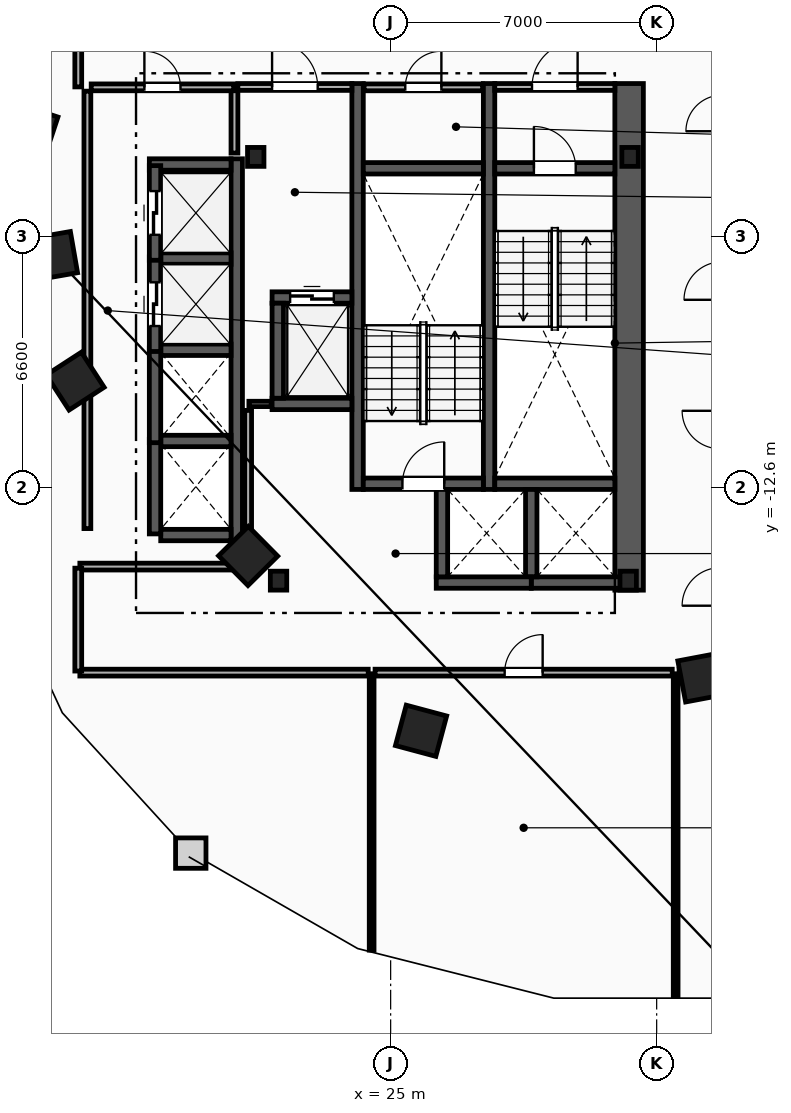
"""IFC4 building model, lengths in metres.
Left out: names, types, materials, properties, quantities, classifications, styles, units other than length and angle.
Written with IfcOpenShell. Run it as: python <this file> out.ifc"""

import sys

from ifc_helpers import new_model, si_unit, direction, frame, frame_2d, origin, origin_2d, place, context, subcontext, project, spatial, rectangle, i_section, extrude, element, fill, save


model = new_model("IFC4")
c1 = context("Model", 3, precision=1e-05, world=origin(), true_north=direction((0.0, 1.0)))
c2 = subcontext(c1, "Body", "Model", "MODEL_VIEW")
j1 = project(units=[si_unit("LENGTHUNIT", "METRE"), si_unit("PLANEANGLEUNIT", "RADIAN")], contexts=[c1])
p1 = place(None, origin())
s1 = spatial("IfcSite", under=j1, at=p1, CompositionType="ELEMENT")
p2 = place(p1, origin())
s2 = spatial("IfcBuilding", under=s1, at=p2, CompositionType="ELEMENT")
p3 = place(p2, frame((0.0, 0.0, 117.8)))
s3 = spatial("IfcBuildingStorey", under=s2, at=p3, CompositionType="ELEMENT", Elevation=117.8)
for number, where, z_axis, x_axis in (
    (1, (31.3, -3.9, 0.0), (0.0, 0.0, 1.0), (1.0, 0.0, 0.0)),
    (2, (21.45, -3.9, 0.0), (0.0, 0.0, 1.0), (1.0, 0.0, 0.0)),
    (3, (22.05, -15.05, 0.0), (0.0, 0.0, 1.0), (1.0, 0.0, 0.0)),
    (4, (31.25, -15.05, 0.0), (0.0, 0.0, 1.0), (1.0, 0.0, 0.0)),
):
    element("IfcColumn", number, at=place(p3, frame(where, z_axis=z_axis, x_axis=x_axis)), inside=s3, PredefinedType="COLUMN", context=c2, shape_type="SweptSolid", body=[
        extrude(i_section(OverallWidth=0.432, OverallDepth=0.498, WebThickness=0.056, FlangeThickness=0.089, FilletRadius=0.018, at=origin_2d()), origin(), (0.0, 0.0, 1.0), 3.6),
    ])
for number, where, z_axis, x_axis in (
    (5, (15.55, -3.2, 0.0), (0.0, 0.0, 1.0), (-0.315, -0.949, 0.0)),
    (6, (16.125, -6.5, 0.0), (0.0, 0.0, 1.0), (0.172, -0.985, 0.0)),
    (7, (16.7, -9.8, 0.0), (0.0, 0.0, 1.0), (0.544, -0.839, 0.0)),
    (8, (21.25, -14.4, 0.0), (0.0, 0.0, 1.0), (0.703, -0.711, 0.0)),
    (9, (25.8, -19.0, 0.0), (0.0, 0.0, 1.0), (0.966, -0.259, 0.0)),
    (10, (33.2, -17.6, 0.0), (0.0, 0.0, 1.0), (0.983, 0.186, 0.0)),
):
    element("IfcColumn", number, at=place(p3, frame(where, z_axis=z_axis, x_axis=x_axis)), inside=s3, PredefinedType="COLUMN", context=c2, shape_type="SweptSolid", body=[
        extrude(rectangle(XDim=1.1, YDim=1.1, at=origin_2d()), origin(), (0.0, 0.0, 1.0), 3.6),
    ])
p4 = place(p3, frame((31.275, -15.3, 0.0), z_axis=(0.0, 0.0, 1.0), x_axis=(0.0, 1.0, 0.0)))
e11 = element("IfcWall", 11, at=p4, inside=s3, PredefinedType="SHEAR", context=c2, shape_type="SweptSolid", body=[
    extrude(rectangle(XDim=13.33, YDim=0.75, at=frame_2d((6.665, 0.0))), origin(), (0.0, 0.0, 1.0), 3.3),
])
for number, where, z_axis, x_axis in (
    (12, (27.59, -12.65, 0.0), (0.0, 0.0, 1.0), (0.0, 1.0, 0.0)),
    (13, (24.13, -12.65, 0.0), (0.0, 0.0, 1.0), (0.0, 1.0, 0.0)),
):
    element("IfcWall", number, at=place(p3, frame(where, z_axis=z_axis, x_axis=x_axis)), inside=s3, PredefinedType="SHEAR", context=c2, shape_type="SweptSolid", body=[
        extrude(rectangle(XDim=10.68, YDim=0.3, at=frame_2d((5.34, 0.0))), origin(), (0.0, 0.0, 1.0), 3.3),
    ])
p5 = place(p3, frame((27.74, -4.2, 0.0), z_axis=(0.0, 0.0, 1.0), x_axis=(1.0, 0.0, 0.0)))
e14 = element("IfcWall", 14, at=p5, inside=s3, PredefinedType="SHEAR", context=c2, shape_type="SweptSolid", body=[
    extrude(rectangle(XDim=3.16, YDim=0.3, at=frame_2d((1.58, 0.0))), origin(), (0.0, 0.0, 1.0), 3.3),
])
p6 = place(p5, frame((1.03, 0.0, 0.0)))
e15 = element("IfcOpeningElement", 15, at=p6, cuts=e14, PredefinedType="OPENING", context=c2, shape_type="SweptSolid", body=[
    extrude(rectangle(XDim=1.1, YDim=2.15, at=frame_2d((0.55, 1.075))), frame((0.0, 0.16, 0.0), z_axis=(0.0, -1.0, 0.0), x_axis=(1.0, 0.0, 0.0)), (0.0, 0.0, 1.0), 0.32),
])
p7 = place(p3, frame((27.74, -12.5, 0.0), z_axis=(0.0, 0.0, 1.0), x_axis=(1.0, 0.0, 0.0)))
e16 = element("IfcWall", 16, at=p7, inside=s3, PredefinedType="SHEAR", context=c2, shape_type="SweptSolid", body=[
    extrude(rectangle(XDim=3.16, YDim=0.3, at=frame_2d((1.58, 0.0))), origin(), (0.0, 0.0, 1.0), 3.3),
])
p8 = place(p3, frame((24.28, -12.5, 0.0), z_axis=(0.0, 0.0, 1.0), x_axis=(1.0, 0.0, 0.0)))
e17 = element("IfcWall", 17, at=p8, inside=s3, PredefinedType="SHEAR", context=c2, shape_type="SweptSolid", body=[
    extrude(rectangle(XDim=3.16, YDim=0.3, at=frame_2d((1.58, 0.0))), origin(), (0.0, 0.0, 1.0), 3.3),
])
p9 = place(p8, frame((1.03, 0.0, 0.0)))
e18 = element("IfcOpeningElement", 18, at=p9, cuts=e17, PredefinedType="OPENING", context=c2, shape_type="SweptSolid", body=[
    extrude(rectangle(XDim=1.1, YDim=2.15, at=frame_2d((0.55, 1.075))), frame((0.0, 0.16, 0.0), z_axis=(0.0, -1.0, 0.0), x_axis=(1.0, 0.0, 0.0)), (0.0, 0.0, 1.0), 0.32),
])
p10 = place(p3, frame((24.28, -4.2, 0.0), z_axis=(0.0, 0.0, 1.0), x_axis=(1.0, 0.0, 0.0)))
e19 = element("IfcWall", 19, at=p10, inside=s3, PredefinedType="SHEAR", context=c2, shape_type="SweptSolid", body=[
    extrude(rectangle(XDim=3.16, YDim=0.3, at=frame_2d((1.58, 0.0))), origin(), (0.0, 0.0, 1.0), 3.3),
])
p11 = place(p3, frame((20.89, -3.8, 0.0), z_axis=(0.0, 0.0, 1.0), x_axis=(0.0, 1.0, 0.0)))
e20 = element("IfcWall", 20, at=p11, inside=s3, PredefinedType="PARTITIONING", context=c2, shape_type="SweptSolid", body=[
    extrude(rectangle(XDim=1.65, YDim=0.18, at=frame_2d((0.825, 0.0))), origin(), (0.0, 0.0, 1.0), 3.3),
])
p12 = place(p3, frame((20.98, -2.06, 0.0), z_axis=(0.0, 0.0, 1.0), x_axis=(1.0, 0.0, 0.0)))
e21 = element("IfcWall", 21, at=p12, inside=s3, PredefinedType="PARTITIONING", context=c2, shape_type="SweptSolid", body=[
    extrude(rectangle(XDim=3.0, YDim=0.18, at=frame_2d((1.5, 0.0))), origin(), (0.0, 0.0, 1.0), 3.3),
])
p13 = place(p12, frame((0.9, 0.0, 0.0)))
e22 = element("IfcOpeningElement", 22, at=p13, cuts=e21, PredefinedType="OPENING", context=c2, shape_type="SweptSolid", body=[
    extrude(rectangle(XDim=1.2, YDim=2.15, at=frame_2d((0.6, 1.075))), frame((0.0, 0.1, 0.0), z_axis=(0.0, -1.0, 0.0), x_axis=(1.0, 0.0, 0.0)), (0.0, 0.0, 1.0), 0.2),
])
p14 = place(p3, frame((27.74, -2.06, 0.0), z_axis=(0.0, 0.0, 1.0), x_axis=(1.0, 0.0, 0.0)))
e23 = element("IfcWall", 23, at=p14, inside=s3, PredefinedType="PARTITIONING", context=c2, shape_type="SweptSolid", body=[
    extrude(rectangle(XDim=3.16, YDim=0.18, at=frame_2d((1.58, 0.0))), origin(), (0.0, 0.0, 1.0), 3.3),
])
p15 = place(p14, frame((0.98, 0.0, 0.0)))
e24 = element("IfcOpeningElement", 24, at=p15, cuts=e23, PredefinedType="OPENING", context=c2, shape_type="SweptSolid", body=[
    extrude(rectangle(XDim=1.2, YDim=2.15, at=frame_2d((0.6, 1.075))), frame((0.0, 0.1, 0.0), z_axis=(0.0, -1.0, 0.0), x_axis=(1.0, 0.0, 0.0)), (0.0, 0.0, 1.0), 0.2),
])
p16 = place(p3, frame((21.88, -7.6, 0.0), z_axis=(0.0, 0.0, 1.0), x_axis=(1.0, 0.0, 0.0)))
e25 = element("IfcWall", 25, at=p16, inside=s3, PredefinedType="SHEAR", context=c2, shape_type="SweptSolid", body=[
    extrude(rectangle(XDim=2.1, YDim=0.3, at=frame_2d((1.05, 0.0))), origin(), (0.0, 0.0, 1.0), 3.3),
])
p17 = place(p16, frame((0.475, 0.0, 0.0)))
e26 = element("IfcOpeningElement", 26, at=p17, cuts=e25, PredefinedType="OPENING", context=c2, shape_type="SweptSolid", body=[
    extrude(rectangle(XDim=1.15, YDim=2.2, at=frame_2d((0.575, 1.1))), frame((0.0, 0.16, 0.0), z_axis=(0.0, -1.0, 0.0), x_axis=(1.0, 0.0, 0.0)), (0.0, 0.0, 1.0), 0.32),
])
p18 = place(p3, frame((21.88, -10.4, 0.0), z_axis=(0.0, 0.0, 1.0), x_axis=(1.0, 0.0, 0.0)))
e27 = element("IfcWall", 27, at=p18, inside=s3, PredefinedType="SHEAR", context=c2, shape_type="SweptSolid", body=[
    extrude(rectangle(XDim=2.1, YDim=0.3, at=frame_2d((1.05, 0.0))), origin(), (0.0, 0.0, 1.0), 3.3),
])
for number, where, z_axis, x_axis in (
    (28, (22.03, -10.25, 0.0), (0.0, 0.0, 1.0), (0.0, 1.0, 0.0)),
    (29, (28.7, -15.1, 0.0), (0.0, 0.0, 1.0), (1.0, 0.0, 0.0)),
):
    element("IfcWall", number, at=place(p3, frame(where, z_axis=z_axis, x_axis=x_axis)), inside=s3, PredefinedType="SHEAR", context=c2, shape_type="SweptSolid", body=[
        extrude(rectangle(XDim=2.5, YDim=0.3, at=frame_2d((1.25, 0.0))), origin(), (0.0, 0.0, 1.0), 3.3),
    ])
p19 = place(p3, frame((28.7, -14.95, 0.0), z_axis=(0.0, 0.0, 1.0), x_axis=(0.0, 1.0, 0.0)))
e30 = element("IfcWall", 30, at=p19, inside=s3, PredefinedType="SHEAR", context=c2, shape_type="SweptSolid", body=[
    extrude(rectangle(XDim=2.3, YDim=0.3, at=frame_2d((1.15, 0.0))), origin(), (0.0, 0.0, 1.0), 3.3),
])
p20 = place(p3, frame((26.2, -15.1, 0.0), z_axis=(0.0, 0.0, 1.0), x_axis=(1.0, 0.0, 0.0)))
e31 = element("IfcWall", 31, at=p20, inside=s3, PredefinedType="SHEAR", context=c2, shape_type="SweptSolid", body=[
    extrude(rectangle(XDim=2.5, YDim=0.3, at=frame_2d((1.25, 0.0))), origin(), (0.0, 0.0, 1.0), 3.3),
])
p21 = place(p3, frame((26.35, -14.95, 0.0), z_axis=(0.0, 0.0, 1.0), x_axis=(0.0, 1.0, 0.0)))
e32 = element("IfcWall", 32, at=p21, inside=s3, PredefinedType="SHEAR", context=c2, shape_type="SweptSolid", body=[
    extrude(rectangle(XDim=2.3, YDim=0.3, at=frame_2d((1.15, 0.0))), origin(), (0.0, 0.0, 1.0), 3.3),
])
p22 = place(p3, frame((20.95, -14.0, 0.0), z_axis=(0.0, 0.0, 1.0), x_axis=(0.0, 1.0, 0.0)))
e33 = element("IfcWall", 33, at=p22, inside=s3, PredefinedType="SHEAR", context=c2, shape_type="SweptSolid", body=[
    extrude(rectangle(XDim=10.05, YDim=0.3, at=frame_2d((5.025, 0.0))), origin(), (0.0, 0.0, 1.0), 3.3),
])
p23 = place(p3, frame((18.95, -13.85, 0.0), z_axis=(0.0, 0.0, 1.0), x_axis=(1.0, 0.0, 0.0)))
e34 = element("IfcWall", 34, at=p23, inside=s3, PredefinedType="SHEAR", context=c2, shape_type="SweptSolid", body=[
    extrude(rectangle(XDim=1.85, YDim=0.3, at=frame_2d((0.925, 0.0))), origin(), (0.0, 0.0, 1.0), 3.3),
])
p24 = place(p3, frame((18.65, -4.1, 0.0), z_axis=(0.0, 0.0, 1.0), x_axis=(1.0, 0.0, 0.0)))
e35 = element("IfcWall", 35, at=p24, inside=s3, PredefinedType="SHEAR", context=c2, shape_type="SweptSolid", body=[
    extrude(rectangle(XDim=2.15, YDim=0.3, at=frame_2d((1.075, 0.0))), origin(), (0.0, 0.0, 1.0), 3.3),
])
for number, where, z_axis, x_axis in (
    (36, (18.95, -11.375, 0.0), (0.0, 0.0, 1.0), (1.0, 0.0, 0.0)),
    (37, (18.95, -8.975, 0.0), (0.0, 0.0, 1.0), (1.0, 0.0, 0.0)),
    (38, (18.95, -6.575, 0.0), (0.0, 0.0, 1.0), (1.0, 0.0, 0.0)),
):
    element("IfcWall", number, at=place(p3, frame(where, z_axis=z_axis, x_axis=x_axis)), inside=s3, PredefinedType="SHEAR", context=c2, shape_type="SweptSolid", body=[
        extrude(rectangle(XDim=1.85, YDim=0.3, at=frame_2d((0.925, 0.0))), origin(), (0.0, 0.0, 1.0), 3.3),
    ])
for number, where, z_axis, x_axis in (
    (39, (18.8, -13.82, 0.0), (0.0, 0.0, 1.0), (0.0, 1.0, 0.0)),
    (40, (18.8, -11.42, 0.0), (0.0, 0.0, 1.0), (0.0, 1.0, 0.0)),
):
    element("IfcWall", number, at=place(p3, frame(where, z_axis=z_axis, x_axis=x_axis)), inside=s3, PredefinedType="SHEAR", context=c2, shape_type="SweptSolid", body=[
        extrude(rectangle(XDim=2.49, YDim=0.3, at=frame_2d((1.245, 0.0))), origin(), (0.0, 0.0, 1.0), 3.3),
    ])
p25 = place(p3, frame((18.8, -9.02, 0.0), z_axis=(0.0, 0.0, 1.0), x_axis=(0.0, 1.0, 0.0)))
e41 = element("IfcWall", 41, at=p25, inside=s3, PredefinedType="SHEAR", context=c2, shape_type="SweptSolid", body=[
    extrude(rectangle(XDim=2.49, YDim=0.3, at=frame_2d((1.245, 0.0))), origin(), (0.0, 0.0, 1.0), 3.3),
])
p26 = place(p25, frame((0.67, 0.0, 0.0)))
e42 = element("IfcOpeningElement", 42, at=p26, cuts=e41, PredefinedType="OPENING", context=c2, shape_type="SweptSolid", body=[
    extrude(rectangle(XDim=1.15, YDim=2.2, at=frame_2d((0.575, 1.1))), frame((0.0, 0.16, 0.0), z_axis=(0.0, -1.0, 0.0), x_axis=(1.0, 0.0, 0.0)), (0.0, 0.0, 1.0), 0.32),
])
p27 = place(p3, frame((18.8, -6.62, 0.0), z_axis=(0.0, 0.0, 1.0), x_axis=(0.0, 1.0, 0.0)))
e43 = element("IfcWall", 43, at=p27, inside=s3, PredefinedType="SHEAR", context=c2, shape_type="SweptSolid", body=[
    extrude(rectangle(XDim=2.49, YDim=0.3, at=frame_2d((1.245, 0.0))), origin(), (0.0, 0.0, 1.0), 3.3),
])
p28 = place(p27, frame((0.67, 0.0, 0.0)))
e44 = element("IfcOpeningElement", 44, at=p28, cuts=e43, PredefinedType="OPENING", context=c2, shape_type="SweptSolid", body=[
    extrude(rectangle(XDim=1.15, YDim=2.2, at=frame_2d((0.575, 1.1))), frame((0.0, 0.16, 0.0), z_axis=(0.0, -1.0, 0.0), x_axis=(1.0, 0.0, 0.0)), (0.0, 0.0, 1.0), 0.32),
])
p29 = place(p3, frame((17.02, -13.68, 0.0), z_axis=(0.0, 0.0, 1.0), x_axis=(0.0, 1.0, 0.0)))
e45 = element("IfcWall", 45, at=p29, inside=s3, PredefinedType="PARTITIONING", context=c2, shape_type="SweptSolid", body=[
    extrude(rectangle(XDim=11.51, YDim=0.18, at=frame_2d((5.755, 0.0))), origin(), (0.0, 0.0, 1.0), 3.3),
])
p30 = place(p3, frame((17.12, -2.07, 0.0), z_axis=(0.0, 0.0, 1.0), x_axis=(1.0, 0.0, 0.0)))
e46 = element("IfcWall", 46, at=p30, inside=s3, PredefinedType="PARTITIONING", context=c2, shape_type="SweptSolid", body=[
    extrude(rectangle(XDim=3.75, YDim=0.18, at=frame_2d((1.875, 0.0))), origin(), (0.0, 0.0, 1.0), 3.3),
])
p31 = place(p30, frame((1.4, 0.0, 0.0)))
e47 = element("IfcOpeningElement", 47, at=p31, cuts=e46, PredefinedType="OPENING", context=c2, shape_type="SweptSolid", body=[
    extrude(rectangle(XDim=0.95, YDim=2.1, at=frame_2d((0.475, 1.05))), frame((0.0, 0.1, 0.0), z_axis=(0.0, -1.0, 0.0), x_axis=(1.0, 0.0, 0.0)), (0.0, 0.0, 1.0), 0.2),
])
p32 = place(p3, frame((21.27, -10.4, 0.0), z_axis=(0.0, 0.0, 1.0), x_axis=(1.0, 0.0, 0.0)))
e48 = element("IfcWall", 48, at=p32, inside=s3, PredefinedType="PARTITIONING", context=c2, shape_type="SweptSolid", body=[
    extrude(rectangle(XDim=0.59, YDim=0.14, at=frame_2d((0.295, 0.0))), origin(), (0.0, 0.0, 1.0), 3.3),
])
p33 = place(p3, frame((21.25, -14.93, 0.0), z_axis=(0.0, 0.0, 1.0), x_axis=(0.0, 1.0, 0.0)))
e49 = element("IfcWall", 49, at=p33, inside=s3, PredefinedType="PARTITIONING", context=c2, shape_type="SweptSolid", body=[
    extrude(rectangle(XDim=4.36, YDim=0.18, at=frame_2d((2.18, 0.0))), origin(), (0.0, 0.0, 1.0), 3.3),
])
p34 = place(p3, frame((24.3, -2.07, 0.0), z_axis=(0.0, 0.0, 1.0), x_axis=(1.0, 0.0, 0.0)))
e50 = element("IfcWall", 50, at=p34, inside=s3, PredefinedType="PARTITIONING", context=c2, shape_type="SweptSolid", body=[
    extrude(rectangle(XDim=3.12, YDim=0.18, at=frame_2d((1.56, 0.0))), origin(), (0.0, 0.0, 1.0), 3.3),
])
p35 = place(p34, frame((1.085, 0.0, 0.0)))
e51 = element("IfcOpeningElement", 51, at=p35, cuts=e50, PredefinedType="OPENING", context=c2, shape_type="SweptSolid", body=[
    extrude(rectangle(XDim=0.95, YDim=2.1, at=frame_2d((0.475, 1.05))), frame((0.0, 0.1, 0.0), z_axis=(0.0, -1.0, 0.0), x_axis=(1.0, 0.0, 0.0)), (0.0, 0.0, 1.0), 0.2),
])
p36 = place(p3, frame((24.5, -24.772, 0.0), z_axis=(0.0, 0.0, 1.0), x_axis=(0.0, 1.0, 0.0)))
e52 = element("IfcWall", 52, at=p36, inside=s3, PredefinedType="PARTITIONING", context=c2, shape_type="SweptSolid", body=[
    extrude(rectangle(XDim=7.272, YDim=0.125, at=frame_2d((3.636, 0.0))), origin(), (0.0, 0.0, 1.0), 3.3),
])
p37 = place(p3, frame((32.5, -25.985, 0.0), z_axis=(0.0, 0.0, 1.0), x_axis=(0.0, 1.0, 0.0)))
e53 = element("IfcWall", 53, at=p37, inside=s3, PredefinedType="PARTITIONING", context=c2, shape_type="SweptSolid", body=[
    extrude(rectangle(XDim=8.485, YDim=0.125, at=frame_2d((4.243, 0.0))), origin(), (0.0, 0.0, 1.0), 3.3),
])
p38 = place(p3, frame((24.59, -17.47, 0.0), z_axis=(0.0, 0.0, 1.0), x_axis=(1.0, 0.0, 0.0)))
e54 = element("IfcWall", 54, at=p38, inside=s3, PredefinedType="PARTITIONING", context=c2, shape_type="SweptSolid", body=[
    extrude(rectangle(XDim=7.82, YDim=0.18, at=frame_2d((3.91, 0.0))), origin(), (0.0, 0.0, 1.0), 3.3),
])
p39 = place(p38, frame((3.41, 0.0, 0.0)))
e55 = element("IfcOpeningElement", 55, at=p39, cuts=e54, PredefinedType="OPENING", context=c2, shape_type="SweptSolid", body=[
    extrude(rectangle(XDim=1.0, YDim=2.15, at=frame_2d((0.5, 1.075))), frame((0.0, 0.1, 0.0), z_axis=(0.0, -1.0, 0.0), x_axis=(1.0, 0.0, 0.0)), (0.0, 0.0, 1.0), 0.2),
])
p40 = place(p3, frame((32.59, -17.47, 0.0), z_axis=(0.0, 0.0, 1.0), x_axis=(1.0, 0.0, 0.0)))
e56 = element("IfcWall", 56, at=p40, inside=s3, PredefinedType="PARTITIONING", context=c2, shape_type="SweptSolid", body=[
    extrude(rectangle(XDim=1.038, YDim=0.18, at=frame_2d((0.519, 0.0))), origin(), (0.0, 0.0, 1.0), 3.3),
])
p41 = place(p3, frame((16.822, -17.47, 0.0), z_axis=(0.0, 0.0, 1.0), x_axis=(1.0, 0.0, 0.0)))
e57 = element("IfcWall", 57, at=p41, inside=s3, PredefinedType="PARTITIONING", context=c2, shape_type="SweptSolid", body=[
    extrude(rectangle(XDim=7.588, YDim=0.18, at=frame_2d((3.794, 0.0))), origin(), (0.0, 0.0, 1.0), 3.3),
])
p42 = place(p3, frame((21.178, -14.68, 0.0), z_axis=(0.0, 0.0, 1.0), x_axis=(-1.0, 0.0, 0.0)))
e58 = element("IfcWall", 58, at=p42, inside=s3, PredefinedType="PARTITIONING", context=c2, shape_type="SweptSolid", body=[
    extrude(rectangle(XDim=4.357, YDim=0.18, at=frame_2d((2.178, 0.0))), origin(), (0.0, 0.0, 1.0), 3.3),
])
p43 = place(p3, frame((16.78, -14.721, 0.0), z_axis=(0.0, 0.0, 1.0), x_axis=(0.0, -1.0, 0.0)))
e59 = element("IfcWall", 59, at=p43, inside=s3, PredefinedType="PARTITIONING", context=c2, shape_type="SweptSolid", body=[
    extrude(rectangle(XDim=2.707, YDim=0.18, at=frame_2d((1.354, 0.0))), origin(), (0.0, 0.0, 1.0), 3.3),
])
p44 = place(p3, frame((16.78, 0.329, 0.0), z_axis=(0.0, 0.0, 1.0), x_axis=(0.0, -1.0, 0.0)))
e60 = element("IfcWall", 60, at=p44, inside=s3, PredefinedType="PARTITIONING", context=c2, shape_type="SweptSolid", body=[
    extrude(rectangle(XDim=2.387, YDim=0.18, at=frame_2d((1.194, 0.0))), origin(), (0.0, 0.0, 1.0), 3.3),
])
p45 = place(p6, origin())
e61 = element("IfcDoor", 61, at=p45, inside=s3, OperationType="SINGLE_SWING_LEFT", PredefinedType="DOOR", context=c2, shape_type="SweptSolid", body=[
    extrude(rectangle(XDim=1.1, YDim=2.15, at=frame_2d((0.55, 1.075))), frame((0.0, 0.025, 0.0), z_axis=(0.0, -1.0, 0.0), x_axis=(1.0, 0.0, 0.0)), (0.0, 0.0, 1.0), 0.05),
])
fill(e15, e61)
p46 = place(p9, origin())
e62 = element("IfcDoor", 62, at=p46, inside=s3, OperationType="SINGLE_SWING_RIGHT", PredefinedType="DOOR", context=c2, shape_type="SweptSolid", body=[
    extrude(rectangle(XDim=1.1, YDim=2.15, at=frame_2d((0.55, 1.075))), frame((0.0, 0.025, 0.0), z_axis=(0.0, -1.0, 0.0), x_axis=(1.0, 0.0, 0.0)), (0.0, 0.0, 1.0), 0.05),
])
fill(e18, e62)
p47 = place(p13, origin())
e63 = element("IfcDoor", 63, at=p47, inside=s3, OperationType="SINGLE_SWING_LEFT", PredefinedType="DOOR", context=c2, shape_type="SweptSolid", body=[
    extrude(rectangle(XDim=1.2, YDim=2.15, at=frame_2d((0.6, 1.075))), frame((0.0, 0.025, 0.0), z_axis=(0.0, -1.0, 0.0), x_axis=(1.0, 0.0, 0.0)), (0.0, 0.0, 1.0), 0.05),
])
fill(e22, e63)
p48 = place(p15, origin())
e64 = element("IfcDoor", 64, at=p48, inside=s3, OperationType="SINGLE_SWING_RIGHT", PredefinedType="DOOR", context=c2, shape_type="SweptSolid", body=[
    extrude(rectangle(XDim=1.2, YDim=2.15, at=frame_2d((0.6, 1.075))), frame((0.0, 0.025, 0.0), z_axis=(0.0, -1.0, 0.0), x_axis=(1.0, 0.0, 0.0)), (0.0, 0.0, 1.0), 0.05),
])
fill(e24, e64)
p49 = place(p17, origin())
e65 = element("IfcDoor", 65, at=p49, inside=s3, OperationType="SLIDING_TO_LEFT", PredefinedType="TRAPDOOR", context=c2, shape_type="SweptSolid", body=[
    extrude(rectangle(XDim=1.15, YDim=2.2, at=frame_2d((0.575, 1.1))), frame((0.0, 0.025, 0.0), z_axis=(0.0, -1.0, 0.0), x_axis=(1.0, 0.0, 0.0)), (0.0, 0.0, 1.0), 0.05),
])
fill(e26, e65)
p50 = place(p26, origin())
e66 = element("IfcDoor", 66, at=p50, inside=s3, OperationType="SLIDING_TO_LEFT", PredefinedType="TRAPDOOR", context=c2, shape_type="SweptSolid", body=[
    extrude(rectangle(XDim=1.15, YDim=2.2, at=frame_2d((0.575, 1.1))), frame((0.0, 0.025, 0.0), z_axis=(0.0, -1.0, 0.0), x_axis=(1.0, 0.0, 0.0)), (0.0, 0.0, 1.0), 0.05),
])
fill(e42, e66)
p51 = place(p28, origin())
e67 = element("IfcDoor", 67, at=p51, inside=s3, OperationType="SLIDING_TO_LEFT", PredefinedType="TRAPDOOR", context=c2, shape_type="SweptSolid", body=[
    extrude(rectangle(XDim=1.15, YDim=2.2, at=frame_2d((0.575, 1.1))), frame((0.0, 0.025, 0.0), z_axis=(0.0, -1.0, 0.0), x_axis=(1.0, 0.0, 0.0)), (0.0, 0.0, 1.0), 0.05),
])
fill(e44, e67)
p52 = place(p39, origin())
e68 = element("IfcDoor", 68, at=p52, inside=s3, OperationType="SINGLE_SWING_RIGHT", PredefinedType="DOOR", context=c2, shape_type="SweptSolid", body=[
    extrude(rectangle(XDim=1.0, YDim=2.15, at=frame_2d((0.5, 1.075))), frame((0.0, 0.025, 0.0), z_axis=(0.0, -1.0, 0.0), x_axis=(1.0, 0.0, 0.0)), (0.0, 0.0, 1.0), 0.05),
])
fill(e55, e68)
p53 = place(p31, origin())
e69 = element("IfcDoor", 69, at=p53, inside=s3, OperationType="SINGLE_SWING_LEFT", PredefinedType="DOOR", context=c2, shape_type="SweptSolid", body=[
    extrude(rectangle(XDim=0.95, YDim=2.1, at=frame_2d((0.475, 1.05))), frame((0.0, 0.025, 0.0), z_axis=(0.0, -1.0, 0.0), x_axis=(1.0, 0.0, 0.0)), (0.0, 0.0, 1.0), 0.05),
])
fill(e47, e69)
p54 = place(p35, origin())
e70 = element("IfcDoor", 70, at=p54, inside=s3, OperationType="SINGLE_SWING_RIGHT", PredefinedType="DOOR", context=c2, shape_type="SweptSolid", body=[
    extrude(rectangle(XDim=0.95, YDim=2.1, at=frame_2d((0.475, 1.05))), frame((0.0, 0.025, 0.0), z_axis=(0.0, -1.0, 0.0), x_axis=(1.0, 0.0, 0.0)), (0.0, 0.0, 1.0), 0.05),
])
fill(e51, e70)
save(model, sys.argv[1])
